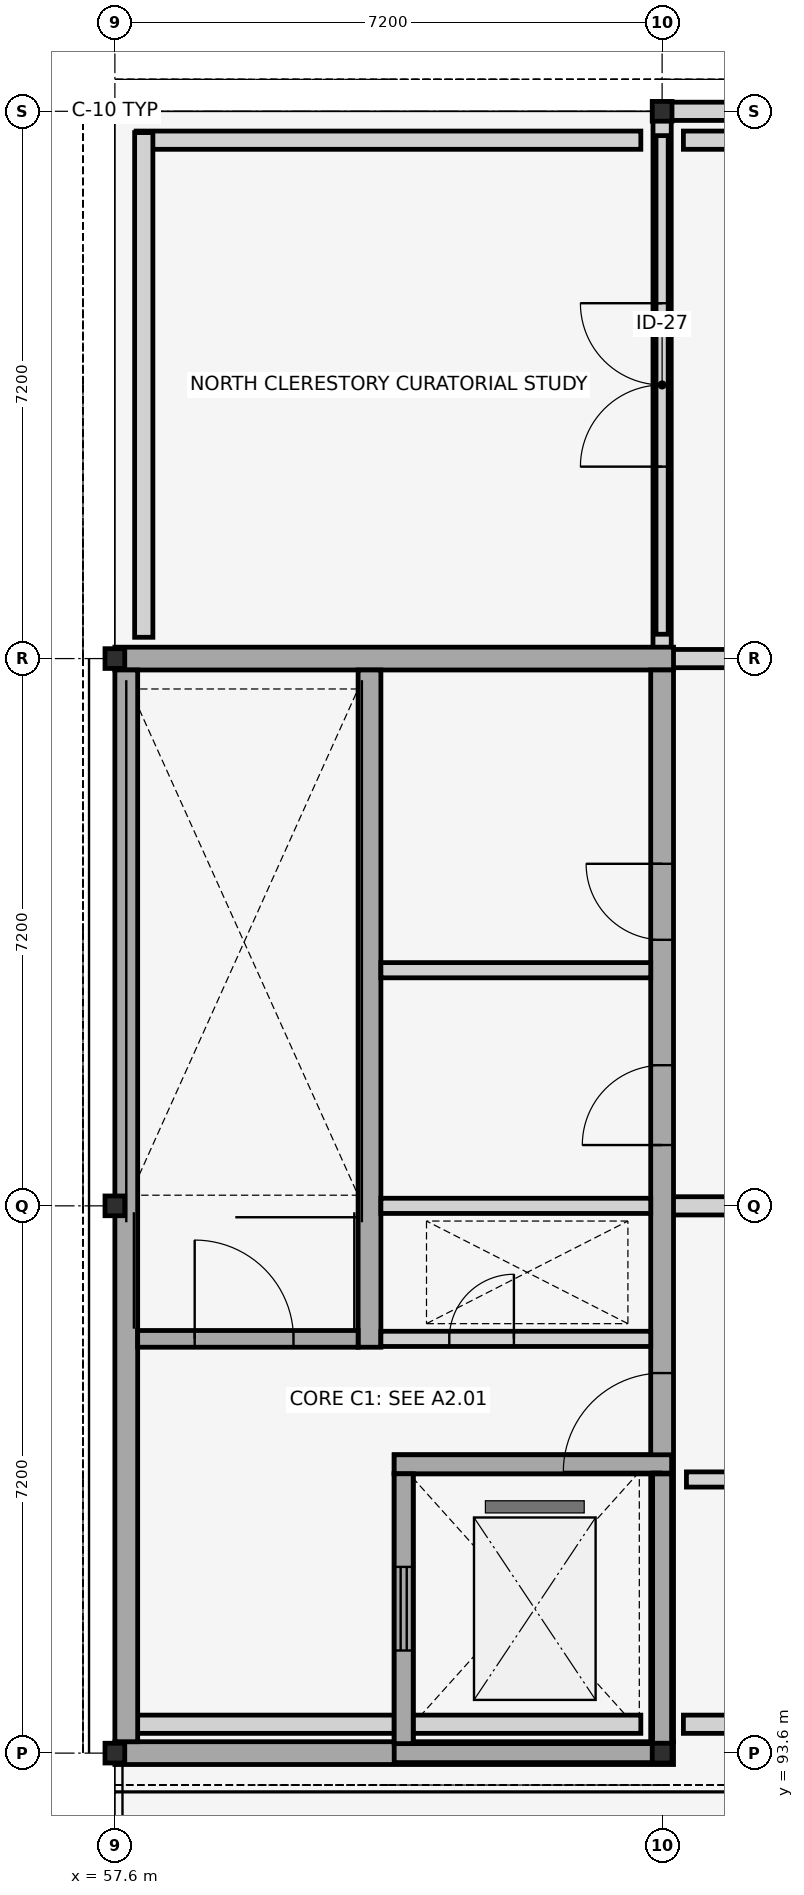
"""IFC4 building model, lengths in metres.
Left out: names, types, materials, properties, quantities, classifications, styles, units other than length and angle.
Written with IfcOpenShell. Run it as: python <this file> out.ifc"""

import sys

from ifc_helpers import new_model, si_unit, direction, frame, frame_2d, origin, origin_2d, place, context, subcontext, project, spatial, polyline, rectangle, i_section, outline, extrude, element, fill, save


model = new_model("IFC4")
c1 = context("Model", 3, precision=1e-05, world=origin(), true_north=direction((0.0, 1.0)))
c2 = subcontext(c1, "Body", "Model", "MODEL_VIEW")
j1 = project(units=[si_unit("LENGTHUNIT", "METRE"), si_unit("PLANEANGLEUNIT", "RADIAN")], contexts=[c1])
p1 = place(None, origin())
s1 = spatial("IfcSite", under=j1, at=p1, CompositionType="ELEMENT")
p2 = place(p1, origin())
s2 = spatial("IfcBuilding", under=s1, at=p2, CompositionType="ELEMENT")
p3 = place(p2, frame((0.0, 0.0, 25.2)))
s3 = spatial("IfcBuildingStorey", under=s2, at=p3, CompositionType="ELEMENT", Elevation=25.2)
for number, where, z_axis, x_axis in (
    (1, (57.6, 93.6, 0.0), (0.0, 0.0, 1.0), (1.0, 0.0, 0.0)),
    (2, (57.6, 100.8, 0.0), (0.0, 0.0, 1.0), (0.0, 1.0, 0.0)),
    (3, (57.6, 108.0, 0.0), (0.0, 0.0, 1.0), (1.0, 0.0, 0.0)),
    (4, (57.6, 115.2, 0.0), (0.0, 0.0, 1.0), (0.0, 1.0, 0.0)),
    (5, (64.8, 93.6, 0.0), (0.0, 0.0, 1.0), (0.0, 1.0, 0.0)),
    (6, (64.8, 115.2, 0.0), (0.0, 0.0, 1.0), (1.0, 0.0, 0.0)),
):
    element("IfcColumn", number, at=place(p3, frame(where, z_axis=z_axis, x_axis=x_axis)), inside=s3, PredefinedType="COLUMN", context=c2, shape_type="SweptSolid", body=[
        extrude(i_section(OverallWidth=0.26, OverallDepth=0.26, WebThickness=0.01, FlangeThickness=0.018, FilletRadius=0.024, at=origin_2d()), origin(), (0.0, 0.0, 1.0), 5.4),
    ])
p4 = place(p3, frame((57.88, 93.98, 0.0), z_axis=(0.0, 0.0, 1.0), x_axis=(1.0, 0.0, 0.0)))
e7 = element("IfcWall", 7, at=p4, inside=s3, PredefinedType="STANDARD", context=c2, shape_type="SweptSolid", body=[
    extrude(rectangle(XDim=6.64, YDim=0.24, at=frame_2d((3.32, 0.0))), origin(), (0.0, 0.0, 1.0), 4.78),
])
for number, where, z_axis, x_axis in (
    (8, (65.08, 93.98, 0.0), (0.0, 0.0, 1.0), (1.0, 0.0, 0.0)),
    (9, (71.72, 114.82, 0.0), (0.0, 0.0, 1.0), (-1.0, 0.0, 0.0)),
):
    element("IfcWall", number, at=place(p3, frame(where, z_axis=z_axis, x_axis=x_axis)), inside=s3, PredefinedType="STANDARD", context=c2, shape_type="SweptSolid", body=[
        extrude(rectangle(XDim=6.64, YDim=0.24, at=frame_2d((3.32, 0.0))), origin(), (0.0, 0.0, 1.0), 4.78),
    ])
p5 = place(p3, frame((64.52, 114.82, 0.0), z_axis=(0.0, 0.0, 1.0), x_axis=(-1.0, 0.0, 0.0)))
e10 = element("IfcWall", 10, at=p5, inside=s3, PredefinedType="STANDARD", context=c2, shape_type="SweptSolid", body=[
    extrude(rectangle(XDim=6.64, YDim=0.24, at=frame_2d((3.32, 0.0))), origin(), (0.0, 0.0, 1.0), 4.78),
])
p6 = place(p3, frame((57.98, 114.92, 0.0), z_axis=(0.0, 0.0, 1.0), x_axis=(0.0, -1.0, 0.0)))
e11 = element("IfcWall", 11, at=p6, inside=s3, PredefinedType="STANDARD", context=c2, shape_type="SweptSolid", body=[
    extrude(rectangle(XDim=6.64, YDim=0.24, at=frame_2d((3.32, 0.0))), origin(), (0.0, 0.0, 1.0), 4.78),
])
p7 = place(p3, frame((71.94, 100.8, 5.42), z_axis=(0.0, 0.0, 1.0), x_axis=(-1.0, 0.0, 0.0)))
e12 = element("IfcWall", 12, at=p7, inside=s3, PredefinedType="STANDARD", context=c2, shape_type="SweptSolid", body=[
    extrude(rectangle(XDim=7.08, YDim=0.24, at=frame_2d((3.54, 0.0))), origin(), (0.0, 0.0, 1.0), 6.46),
])
p8 = place(p7, frame((0.87, 0.0, 0.7)))
e13 = element("IfcOpeningElement", 13, at=p8, cuts=e12, PredefinedType="OPENING", context=c2, shape_type="SweptSolid", body=[
    extrude(rectangle(XDim=1.8, YDim=2.4, at=frame_2d((0.9, 1.2))), frame((0.0, 0.13, 0.0), z_axis=(0.0, -1.0, 0.0), x_axis=(1.0, 0.0, 0.0)), (0.0, 0.0, 1.0), 0.26),
])
p9 = place(p7, frame((4.41, 0.0, 0.7)))
e14 = element("IfcOpeningElement", 14, at=p9, cuts=e12, PredefinedType="OPENING", context=c2, shape_type="SweptSolid", body=[
    extrude(rectangle(XDim=1.8, YDim=2.4, at=frame_2d((0.9, 1.2))), frame((0.0, 0.13, 0.0), z_axis=(0.0, -1.0, 0.0), x_axis=(1.0, 0.0, 0.0)), (0.0, 0.0, 1.0), 0.26),
])
p10 = place(p3, frame((64.8, 97.55, 5.42), z_axis=(0.0, 0.0, 1.0), x_axis=(0.0, 1.0, 0.0)))
e15 = element("IfcWall", 15, at=p10, inside=s3, PredefinedType="STANDARD", context=c2, shape_type="SweptSolid", body=[
    extrude(outline(polyline([(0.0, 0.0), (3.25, 0.0), (3.25, 6.46), (0.0, 0.13), (0.0, 0.0)])), frame((0.0, 0.12, 0.0), z_axis=(0.0, -1.0, 0.0), x_axis=(1.0, 0.0, 0.0)), (0.0, 0.0, 1.0), 0.24),
])
p11 = place(p3, frame((71.94, 108.0, 5.42), z_axis=(0.0, 0.0, 1.0), x_axis=(-1.0, 0.0, 0.0)))
e16 = element("IfcWall", 16, at=p11, inside=s3, PredefinedType="STANDARD", context=c2, shape_type="SweptSolid", body=[
    extrude(rectangle(XDim=7.08, YDim=0.24, at=frame_2d((3.54, 0.0))), origin(), (0.0, 0.0, 1.0), 6.46),
])
p12 = place(p11, frame((0.795, 0.0, 0.7)))
e17 = element("IfcOpeningElement", 17, at=p12, cuts=e16, PredefinedType="OPENING", context=c2, shape_type="SweptSolid", body=[
    extrude(rectangle(XDim=1.95, YDim=2.5, at=frame_2d((0.975, 1.25))), frame((0.0, 0.13, 0.0), z_axis=(0.0, -1.0, 0.0), x_axis=(1.0, 0.0, 0.0)), (0.0, 0.0, 1.0), 0.26),
])
p13 = place(p11, frame((4.335, 0.0, 0.7)))
e18 = element("IfcOpeningElement", 18, at=p13, cuts=e16, PredefinedType="OPENING", context=c2, shape_type="SweptSolid", body=[
    extrude(rectangle(XDim=1.95, YDim=2.5, at=frame_2d((0.975, 1.25))), frame((0.0, 0.13, 0.0), z_axis=(0.0, -1.0, 0.0), x_axis=(1.0, 0.0, 0.0)), (0.0, 0.0, 1.0), 0.26),
])
p14 = place(p3, frame((64.8, 100.8, 5.42), z_axis=(0.0, 0.0, 1.0), x_axis=(0.0, 1.0, 0.0)))
e19 = element("IfcWall", 19, at=p14, inside=s3, PredefinedType="STANDARD", context=c2, shape_type="SweptSolid", body=[
    extrude(outline(polyline([(0.0, 0.0), (7.2, 0.0), (7.2, 6.46), (0.0, 0.13), (0.0, 0.0)])), frame((0.0, 0.12, 0.0), z_axis=(0.0, -1.0, 0.0), x_axis=(1.0, 0.0, 0.0)), (0.0, 0.0, 1.0), 0.24),
])
p15 = place(p3, frame((71.94, 115.2, 5.42), z_axis=(0.0, 0.0, 1.0), x_axis=(-1.0, 0.0, 0.0)))
e20 = element("IfcWall", 20, at=p15, inside=s3, PredefinedType="STANDARD", context=c2, shape_type="SweptSolid", body=[
    extrude(rectangle(XDim=7.08, YDim=0.24, at=frame_2d((3.54, 0.0))), origin(), (0.0, 0.0, 1.0), 6.46),
])
p16 = place(p15, frame((1.02, 0.0, 0.7)))
e21 = element("IfcOpeningElement", 21, at=p16, cuts=e20, PredefinedType="OPENING", context=c2, shape_type="SweptSolid", body=[
    extrude(rectangle(XDim=1.5, YDim=2.1, at=frame_2d((0.75, 1.05))), frame((0.0, 0.13, 0.0), z_axis=(0.0, -1.0, 0.0), x_axis=(1.0, 0.0, 0.0)), (0.0, 0.0, 1.0), 0.26),
])
p17 = place(p15, frame((4.56, 0.0, 0.7)))
e22 = element("IfcOpeningElement", 22, at=p17, cuts=e20, PredefinedType="OPENING", context=c2, shape_type="SweptSolid", body=[
    extrude(rectangle(XDim=1.5, YDim=2.1, at=frame_2d((0.75, 1.05))), frame((0.0, 0.13, 0.0), z_axis=(0.0, -1.0, 0.0), x_axis=(1.0, 0.0, 0.0)), (0.0, 0.0, 1.0), 0.26),
])
p18 = place(p3, frame((64.8, 108.0, 5.42), z_axis=(0.0, 0.0, 1.0), x_axis=(0.0, 1.0, 0.0)))
e23 = element("IfcWall", 23, at=p18, inside=s3, PredefinedType="STANDARD", context=c2, shape_type="SweptSolid", body=[
    extrude(outline(polyline([(0.0, 0.0), (7.2, 0.0), (7.2, 6.46), (0.0, 0.13), (0.0, 0.0)])), frame((0.0, 0.12, 0.0), z_axis=(0.0, -1.0, 0.0), x_axis=(1.0, 0.0, 0.0)), (0.0, 0.0, 1.0), 0.24),
])
for number, where, z_axis, x_axis in (
    (24, (57.6, 93.6, 0.0), (0.0, 0.0, 1.0), (1.0, 0.0, 0.0)),
    (25, (57.6, 108.0, 0.0), (0.0, 0.0, 1.0), (1.0, 0.0, 0.0)),
):
    element("IfcWall", number, at=place(p3, frame(where, z_axis=z_axis, x_axis=x_axis)), inside=s3, PredefinedType="SHEAR", context=c2, shape_type="SweptSolid", body=[
        extrude(rectangle(XDim=7.35, YDim=0.3, at=frame_2d((3.675, 0.0))), origin(), (0.0, 0.0, 1.0), 5.18),
    ])
p19 = place(p3, frame((57.75, 93.75, 0.0), z_axis=(0.0, 0.0, 1.0), x_axis=(0.0, 1.0, 0.0)))
e26 = element("IfcWall", 26, at=p19, inside=s3, PredefinedType="SHEAR", context=c2, shape_type="SweptSolid", body=[
    extrude(rectangle(XDim=14.1, YDim=0.3, at=frame_2d((7.05, 0.0))), origin(), (0.0, 0.0, 1.0), 5.18),
])
p20 = place(p3, frame((64.8, 93.75, 0.0), z_axis=(0.0, 0.0, 1.0), x_axis=(0.0, 1.0, 0.0)))
e27 = element("IfcWall", 27, at=p20, inside=s3, PredefinedType="SHEAR", context=c2, shape_type="SweptSolid", body=[
    extrude(rectangle(XDim=14.1, YDim=0.3, at=frame_2d((7.05, 0.0))), origin(), (0.0, 0.0, 1.0), 5.18),
])
p21 = place(p20, frame((3.55, 0.0, 0.0)))
e28 = element("IfcOpeningElement", 28, at=p21, cuts=e27, PredefinedType="OPENING", context=c2, shape_type="SweptSolid", body=[
    extrude(rectangle(XDim=1.3, YDim=2.2, at=frame_2d((0.65, 1.1))), frame((0.0, 0.16, 0.0), z_axis=(0.0, -1.0, 0.0), x_axis=(1.0, 0.0, 0.0)), (0.0, 0.0, 1.0), 0.32),
])
p22 = place(p20, frame((7.85, 0.0, 0.0)))
e29 = element("IfcOpeningElement", 29, at=p22, cuts=e27, PredefinedType="OPENING", context=c2, shape_type="SweptSolid", body=[
    extrude(rectangle(XDim=1.05, YDim=2.15, at=frame_2d((0.525, 1.075))), frame((0.0, 0.16, 0.0), z_axis=(0.0, -1.0, 0.0), x_axis=(1.0, 0.0, 0.0)), (0.0, 0.0, 1.0), 0.32),
])
p23 = place(p20, frame((10.55, 0.0, 0.0)))
e30 = element("IfcOpeningElement", 30, at=p23, cuts=e27, PredefinedType="OPENING", context=c2, shape_type="SweptSolid", body=[
    extrude(rectangle(XDim=1.0, YDim=2.15, at=frame_2d((0.5, 1.075))), frame((0.0, 0.16, 0.0), z_axis=(0.0, -1.0, 0.0), x_axis=(1.0, 0.0, 0.0)), (0.0, 0.0, 1.0), 0.32),
])
p24 = place(p3, frame((61.4, 93.75, 0.0), z_axis=(0.0, 0.0, 1.0), x_axis=(0.0, 1.0, 0.0)))
e31 = element("IfcWall", 31, at=p24, inside=s3, PredefinedType="SHEAR", context=c2, shape_type="SweptSolid", body=[
    extrude(rectangle(XDim=3.525, YDim=0.25, at=frame_2d((1.762, 0.0))), origin(), (0.0, 0.0, 1.0), 5.18),
])
p25 = place(p24, frame((1.2, 0.0, 0.0)))
e32 = element("IfcOpeningElement", 32, at=p25, cuts=e31, PredefinedType="OPENING", context=c2, shape_type="SweptSolid", body=[
    extrude(rectangle(XDim=1.1, YDim=2.15, at=frame_2d((0.55, 1.075))), frame((0.0, 0.135, 0.0), z_axis=(0.0, -1.0, 0.0), x_axis=(1.0, 0.0, 0.0)), (0.0, 0.0, 1.0), 0.27),
])
p26 = place(p3, frame((60.95, 98.94, 0.0), z_axis=(0.0, 0.0, 1.0), x_axis=(0.0, 1.0, 0.0)))
e33 = element("IfcWall", 33, at=p26, inside=s3, PredefinedType="SHEAR", context=c2, shape_type="SweptSolid", body=[
    extrude(rectangle(XDim=8.91, YDim=0.3, at=frame_2d((4.455, 0.0))), origin(), (0.0, 0.0, 1.0), 5.18),
])
p27 = place(p3, frame((61.1, 99.05, 0.0), z_axis=(0.0, 0.0, 1.0), x_axis=(1.0, 0.0, 0.0)))
e34 = element("IfcWall", 34, at=p27, inside=s3, PredefinedType="PLUMBINGWALL", context=c2, shape_type="SweptSolid", body=[
    extrude(rectangle(XDim=3.55, YDim=0.2, at=frame_2d((1.775, 0.0))), origin(), (0.0, 0.0, 1.0), 4.6),
])
p28 = place(p27, frame((0.9, 0.0, 0.0)))
e35 = element("IfcOpeningElement", 35, at=p28, cuts=e34, PredefinedType="OPENING", context=c2, shape_type="SweptSolid", body=[
    extrude(rectangle(XDim=0.85, YDim=2.05, at=frame_2d((0.425, 1.025))), frame((0.0, 0.11, 0.0), z_axis=(0.0, -1.0, 0.0), x_axis=(1.0, 0.0, 0.0)), (0.0, 0.0, 1.0), 0.22),
])
p29 = place(p3, frame((57.9, 99.05, 0.0), z_axis=(0.0, 0.0, 1.0), x_axis=(1.0, 0.0, 0.0)))
e36 = element("IfcWall", 36, at=p29, inside=s3, PredefinedType="SHEAR", context=c2, shape_type="SweptSolid", body=[
    extrude(rectangle(XDim=2.9, YDim=0.22, at=frame_2d((1.45, 0.0))), origin(), (0.0, 0.0, 1.0), 5.18),
])
p30 = place(p29, frame((0.75, 0.0, 0.0)))
e37 = element("IfcOpeningElement", 37, at=p30, cuts=e36, PredefinedType="OPENING", context=c2, shape_type="SweptSolid", body=[
    extrude(rectangle(XDim=1.3, YDim=2.2, at=frame_2d((0.65, 1.1))), frame((0.0, 0.12, 0.0), z_axis=(0.0, -1.0, 0.0), x_axis=(1.0, 0.0, 0.0)), (0.0, 0.0, 1.0), 0.24),
])
p31 = place(p3, frame((61.275, 97.4, 0.0), z_axis=(0.0, 0.0, 1.0), x_axis=(1.0, 0.0, 0.0)))
e38 = element("IfcWall", 38, at=p31, inside=s3, PredefinedType="SHEAR", context=c2, shape_type="SweptSolid", body=[
    extrude(rectangle(XDim=3.375, YDim=0.25, at=frame_2d((1.688, 0.0))), origin(), (0.0, 0.0, 1.0), 5.18),
])
for number, where, z_axis, x_axis in (
    (39, (61.1, 100.8, 0.0), (0.0, 0.0, 1.0), (1.0, 0.0, 0.0)),
    (40, (61.1, 103.9, 0.0), (0.0, 0.0, 1.0), (1.0, 0.0, 0.0)),
):
    element("IfcWall", number, at=place(p3, frame(where, z_axis=z_axis, x_axis=x_axis)), inside=s3, PredefinedType="PLUMBINGWALL", context=c2, shape_type="SweptSolid", body=[
        extrude(rectangle(XDim=3.55, YDim=0.2, at=frame_2d((1.775, 0.0))), origin(), (0.0, 0.0, 1.0), 4.6),
    ])
p32 = place(p3, frame((61.275, 93.6, 5.18), z_axis=(0.0, 0.0, 1.0), x_axis=(1.0, 0.0, 0.0)))
e41 = element("IfcWall", 41, at=p32, inside=s3, PredefinedType="SHEAR", context=c2, shape_type="SweptSolid", body=[
    extrude(rectangle(XDim=3.65, YDim=0.25, at=frame_2d((1.825, 0.0))), origin(), (0.0, 0.0, 1.0), 1.72),
])
p33 = place(p3, frame((64.8, 93.725, 5.18), z_axis=(0.0, 0.0, 1.0), x_axis=(0.0, 1.0, 0.0)))
e42 = element("IfcWall", 42, at=p33, inside=s3, PredefinedType="SHEAR", context=c2, shape_type="SweptSolid", body=[
    extrude(rectangle(XDim=3.55, YDim=0.25, at=frame_2d((1.775, 0.0))), origin(), (0.0, 0.0, 1.0), 1.72),
])
p34 = place(p3, frame((64.925, 97.4, 5.18), z_axis=(0.0, 0.0, 1.0), x_axis=(-1.0, 0.0, 0.0)))
e43 = element("IfcWall", 43, at=p34, inside=s3, PredefinedType="SHEAR", context=c2, shape_type="SweptSolid", body=[
    extrude(rectangle(XDim=3.65, YDim=0.25, at=frame_2d((1.825, 0.0))), origin(), (0.0, 0.0, 1.0), 1.72),
])
p35 = place(p3, frame((61.4, 97.275, 5.18), z_axis=(0.0, 0.0, 1.0), x_axis=(0.0, -1.0, 0.0)))
e44 = element("IfcWall", 44, at=p35, inside=s3, PredefinedType="SHEAR", context=c2, shape_type="SweptSolid", body=[
    extrude(rectangle(XDim=3.55, YDim=0.25, at=frame_2d((1.775, 0.0))), origin(), (0.0, 0.0, 1.0), 1.72),
])
p36 = place(p3, frame((65.12, 97.2, 0.0), z_axis=(0.0, 0.0, 1.0), x_axis=(1.0, 0.0, 0.0)))
e45 = element("IfcWall", 45, at=p36, inside=s3, PredefinedType="PARTITIONING", context=c2, shape_type="SweptSolid", body=[
    extrude(rectangle(XDim=20.96, YDim=0.2, at=frame_2d((10.48, 0.0))), origin(), (0.0, 0.0, 1.0), 4.35),
])
p37 = place(p36, frame((9.73, 0.0, 0.0)))
e46 = element("IfcOpeningElement", 46, at=p37, cuts=e45, PredefinedType="OPENING", context=c2, shape_type="SweptSolid", body=[
    extrude(rectangle(XDim=1.5, YDim=2.25, at=frame_2d((0.75, 1.125))), frame((0.0, 0.11, 0.0), z_axis=(0.0, -1.0, 0.0), x_axis=(1.0, 0.0, 0.0)), (0.0, 0.0, 1.0), 0.22),
])
p38 = place(p3, frame((64.8, 108.32, 0.0), z_axis=(0.0, 0.0, 1.0), x_axis=(0.0, 1.0, 0.0)))
e47 = element("IfcWall", 47, at=p38, inside=s3, PredefinedType="PARTITIONING", context=c2, shape_type="SweptSolid", body=[
    extrude(rectangle(XDim=6.56, YDim=0.16, at=frame_2d((3.28, 0.0))), origin(), (0.0, 0.0, 1.0), 4.35),
])
p39 = place(p38, frame((2.205, 0.0, 0.0)))
e48 = element("IfcOpeningElement", 48, at=p39, cuts=e47, PredefinedType="OPENING", context=c2, shape_type="SweptSolid", body=[
    extrude(rectangle(XDim=2.15, YDim=2.65, at=frame_2d((1.075, 1.325))), frame((0.0, 0.09, 0.0), z_axis=(0.0, -1.0, 0.0), x_axis=(1.0, 0.0, 0.0)), (0.0, 0.0, 1.0), 0.18),
])
p40 = place(p21, origin())
e49 = element("IfcDoor", 49, at=p40, inside=s3, OperationType="SINGLE_SWING_LEFT", PredefinedType="DOOR", context=c2, shape_type="SweptSolid", body=[
    extrude(rectangle(XDim=1.3, YDim=2.2, at=frame_2d((0.65, 1.1))), frame((0.0, 0.025, 0.0), z_axis=(0.0, -1.0, 0.0), x_axis=(1.0, 0.0, 0.0)), (0.0, 0.0, 1.0), 0.05),
])
fill(e28, e49)
p41 = place(p22, origin())
e50 = element("IfcDoor", 50, at=p41, inside=s3, OperationType="SINGLE_SWING_LEFT", PredefinedType="DOOR", context=c2, shape_type="SweptSolid", body=[
    extrude(rectangle(XDim=1.05, YDim=2.15, at=frame_2d((0.525, 1.075))), frame((0.0, 0.025, 0.0), z_axis=(0.0, -1.0, 0.0), x_axis=(1.0, 0.0, 0.0)), (0.0, 0.0, 1.0), 0.05),
])
fill(e29, e50)
p42 = place(p23, origin())
e51 = element("IfcDoor", 51, at=p42, inside=s3, OperationType="SINGLE_SWING_RIGHT", PredefinedType="DOOR", context=c2, shape_type="SweptSolid", body=[
    extrude(rectangle(XDim=1.0, YDim=2.15, at=frame_2d((0.5, 1.075))), frame((0.0, 0.025, 0.0), z_axis=(0.0, -1.0, 0.0), x_axis=(1.0, 0.0, 0.0)), (0.0, 0.0, 1.0), 0.05),
])
fill(e30, e51)
p43 = place(p25, origin())
e52 = element("IfcDoor", 52, at=p43, inside=s3, OperationType="SLIDING_TO_LEFT", PredefinedType="DOOR", context=c2, shape_type="SweptSolid", body=[
    extrude(rectangle(XDim=1.1, YDim=2.15, at=frame_2d((0.55, 1.075))), frame((0.0, 0.025, 0.0), z_axis=(0.0, -1.0, 0.0), x_axis=(1.0, 0.0, 0.0)), (0.0, 0.0, 1.0), 0.05),
])
fill(e32, e52)
p44 = place(p28, origin())
e53 = element("IfcDoor", 53, at=p44, inside=s3, OperationType="SINGLE_SWING_RIGHT", PredefinedType="TRAPDOOR", context=c2, shape_type="SweptSolid", body=[
    extrude(rectangle(XDim=0.85, YDim=2.05, at=frame_2d((0.425, 1.025))), frame((0.0, 0.025, 0.0), z_axis=(0.0, -1.0, 0.0), x_axis=(1.0, 0.0, 0.0)), (0.0, 0.0, 1.0), 0.05),
])
fill(e35, e53)
p45 = place(p30, origin())
e54 = element("IfcDoor", 54, at=p45, inside=s3, OperationType="SINGLE_SWING_LEFT", PredefinedType="DOOR", context=c2, shape_type="SweptSolid", body=[
    extrude(rectangle(XDim=1.3, YDim=2.2, at=frame_2d((0.65, 1.1))), frame((0.0, 0.025, 0.0), z_axis=(0.0, -1.0, 0.0), x_axis=(1.0, 0.0, 0.0)), (0.0, 0.0, 1.0), 0.05),
])
fill(e37, e54)
p46 = place(p39, origin())
e55 = element("IfcDoor", 55, at=p46, inside=s3, OperationType="DOUBLE_DOOR_SINGLE_SWING", PredefinedType="DOOR", context=c2, shape_type="SweptSolid", body=[
    extrude(rectangle(XDim=2.15, YDim=2.65, at=frame_2d((1.075, 1.325))), frame((0.0, 0.025, 0.0), z_axis=(0.0, -1.0, 0.0), x_axis=(1.0, 0.0, 0.0)), (0.0, 0.0, 1.0), 0.05),
])
fill(e48, e55)
save(model, sys.argv[1])
